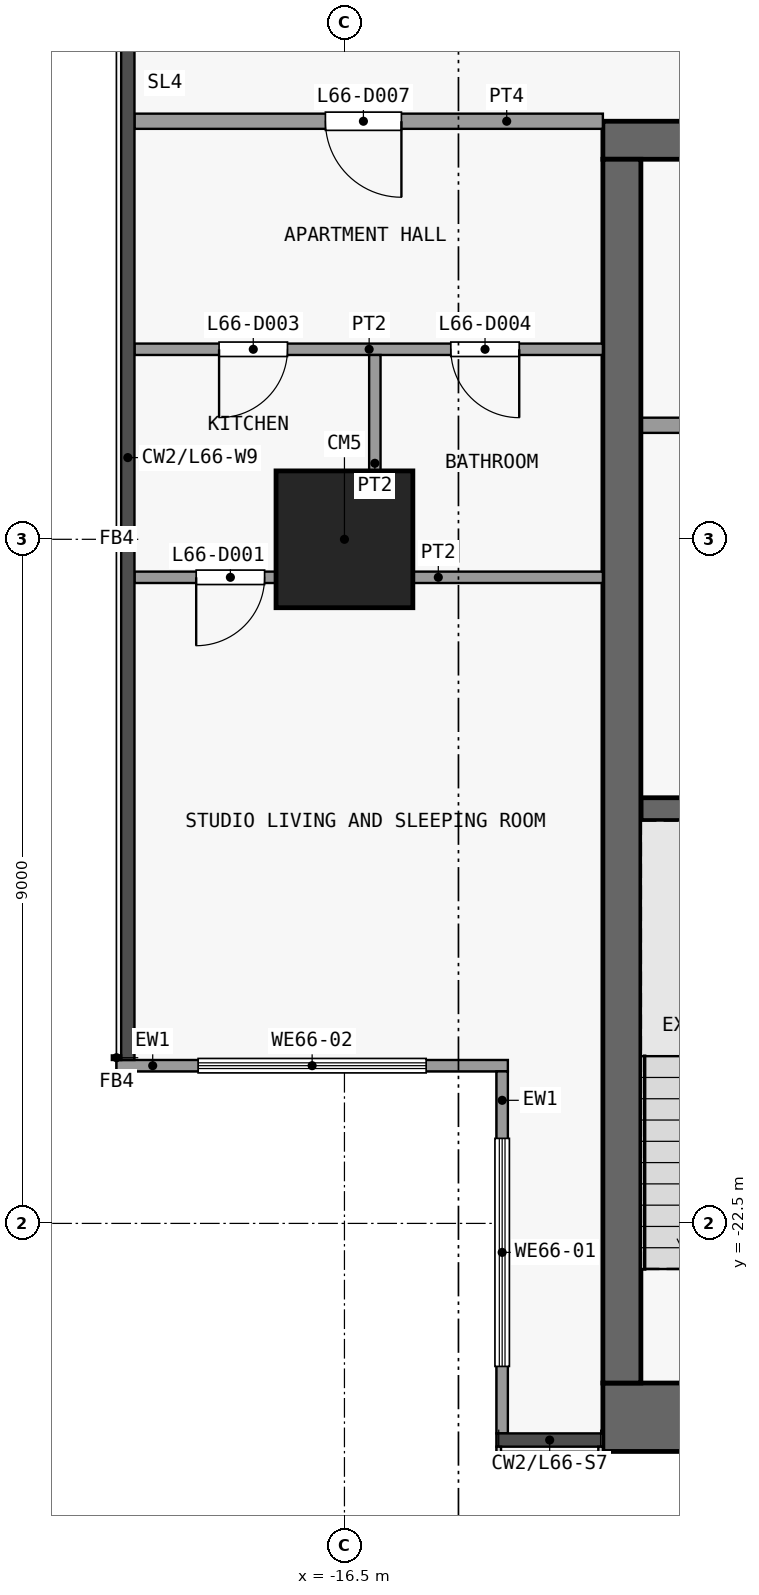
"""IFC4 building model, lengths in metres.
Left out: names, types, materials, properties, quantities, classifications, styles, units other than length and angle.
Written with IfcOpenShell. Run it as: python <this file> out.ifc"""

import sys

from ifc_helpers import new_model, si_unit, direction, frame, frame_2d, origin, origin_2d, place, context, subcontext, project, spatial, rectangle, extrude, element, fill, save


model = new_model("IFC4")
c1 = context("Model", 3, precision=1e-05, world=origin(), true_north=direction((0.0, 1.0)))
c2 = subcontext(c1, "Body", "Model", "MODEL_VIEW")
j1 = project(units=[si_unit("LENGTHUNIT", "METRE"), si_unit("PLANEANGLEUNIT", "RADIAN")], contexts=[c1])
p1 = place(None, origin())
s1 = spatial("IfcSite", under=j1, at=p1, CompositionType="ELEMENT")
p2 = place(p1, origin())
s2 = spatial("IfcBuilding", under=s1, at=p2, CompositionType="ELEMENT")
p3 = place(p2, frame((0.0, 0.0, 262.7)))
s3 = spatial("IfcBuildingStorey", under=s2, at=p3, CompositionType="ELEMENT", Elevation=262.7)
p4 = place(p3, frame((-16.5, -13.5, 0.0), z_axis=(0.0, 0.0, 1.0), x_axis=(1.0, 0.0, 0.0)))
e1 = element("IfcColumn", 1, at=p4, inside=s3, PredefinedType="COLUMN", context=c2, shape_type="SweptSolid", body=[
    extrude(rectangle(XDim=1.8, YDim=1.8, at=origin_2d()), origin(), (0.0, 0.0, 1.0), 3.6),
])
p5 = place(p3, frame((-13.1, -25.05, 0.0), z_axis=(0.0, 0.0, 1.0), x_axis=(1.0, 0.0, 0.0)))
e2 = element("IfcWall", 2, at=p5, inside=s3, PredefinedType="SHEAR", context=c2, shape_type="SweptSolid", body=[
    extrude(rectangle(XDim=26.2, YDim=0.9, at=frame_2d((13.1, 0.0))), origin(), (0.0, 0.0, 1.0), 3.3),
])
p6 = place(p3, frame((-13.1, -8.25, 0.0), z_axis=(0.0, 0.0, 1.0), x_axis=(1.0, 0.0, 0.0)))
e3 = element("IfcWall", 3, at=p6, inside=s3, PredefinedType="SHEAR", context=c2, shape_type="SweptSolid", body=[
    extrude(rectangle(XDim=26.2, YDim=0.5, at=frame_2d((13.1, 0.0))), origin(), (0.0, 0.0, 1.0), 3.3),
])
p7 = place(p6, frame((7.4, 0.0, 0.0)))
e4 = element("IfcOpeningElement", 4, at=p7, cuts=e3, PredefinedType="OPENING", context=c2, shape_type="SweptSolid", body=[
    extrude(rectangle(XDim=1.8, YDim=2.1, at=frame_2d((0.9, 1.05))), frame((0.0, 0.26, 0.0), z_axis=(0.0, -1.0, 0.0), x_axis=(1.0, 0.0, 0.0)), (0.0, 0.0, 1.0), 0.52),
])
p8 = place(p6, frame((17.0, 0.0, 0.0)))
e5 = element("IfcOpeningElement", 5, at=p8, cuts=e3, PredefinedType="OPENING", context=c2, shape_type="SweptSolid", body=[
    extrude(rectangle(XDim=1.8, YDim=2.1, at=frame_2d((0.9, 1.05))), frame((0.0, 0.26, 0.0), z_axis=(0.0, -1.0, 0.0), x_axis=(1.0, 0.0, 0.0)), (0.0, 0.0, 1.0), 0.52),
])
p9 = place(p6, frame((2.325, 0.0, 0.0)))
e6 = element("IfcOpeningElement", 6, at=p9, cuts=e3, PredefinedType="OPENING", context=c2, shape_type="SweptSolid", body=[
    extrude(rectangle(XDim=0.9, YDim=2.1, at=frame_2d((0.45, 1.05))), frame((0.0, 0.26, 0.0), z_axis=(0.0, -1.0, 0.0), x_axis=(1.0, 0.0, 0.0)), (0.0, 0.0, 1.0), 0.52),
])
p10 = place(p6, frame((23.675, 0.0, 0.0)))
e7 = element("IfcOpeningElement", 7, at=p10, cuts=e3, PredefinedType="OPENING", context=c2, shape_type="SweptSolid", body=[
    extrude(rectangle(XDim=1.2, YDim=2.1, at=frame_2d((0.6, 1.05))), frame((0.0, 0.26, 0.0), z_axis=(0.0, -1.0, 0.0), x_axis=(1.0, 0.0, 0.0)), (0.0, 0.0, 1.0), 0.52),
])
p11 = place(p3, frame((-12.85, -24.6, 0.0), z_axis=(0.0, 0.0, 1.0), x_axis=(0.0, 1.0, 0.0)))
e8 = element("IfcWall", 8, at=p11, inside=s3, PredefinedType="SHEAR", context=c2, shape_type="SweptSolid", body=[
    extrude(rectangle(XDim=16.1, YDim=0.5, at=frame_2d((8.05, 0.0))), origin(), (0.0, 0.0, 1.0), 3.3),
])
p12 = place(p3, frame((-12.6, -17.05, 0.0), z_axis=(0.0, 0.0, 1.0), x_axis=(1.0, 0.0, 0.0)))
e9 = element("IfcWall", 9, at=p12, inside=s3, PredefinedType="SHEAR", context=c2, shape_type="SweptSolid", body=[
    extrude(rectangle(XDim=3.1, YDim=0.3, at=frame_2d((1.55, 0.0))), origin(), (0.0, 0.0, 1.0), 3.3),
])
p13 = place(p3, frame((-12.6, -12.0, 0.0), z_axis=(0.0, 0.0, 1.0), x_axis=(1.0, 0.0, 0.0)))
e10 = element("IfcWall", 10, at=p13, inside=s3, PredefinedType="PARTITIONING", context=c2, shape_type="SweptSolid", body=[
    extrude(rectangle(XDim=1.45, YDim=0.2, at=frame_2d((0.725, 0.0))), origin(), (0.0, 0.0, 1.0), 3.3),
])
p14 = place(p3, frame((-14.425, -25.262, 0.0), z_axis=(0.0, 0.0, 1.0), x_axis=(0.0, 1.0, 0.0)))
e11 = element("IfcWall", 11, at=p14, inside=s3, PredefinedType="SOLIDWALL", context=c2, shape_type="SweptSolid", body=[
    extrude(rectangle(XDim=4.762, YDim=0.15, at=frame_2d((2.381, 0.0))), origin(), (0.0, 0.0, 1.0), 3.3),
])
p15 = place(p14, frame((0.881, 0.0, 0.9)))
e12 = element("IfcOpeningElement", 12, at=p15, cuts=e11, PredefinedType="OPENING", context=c2, shape_type="SweptSolid", body=[
    extrude(rectangle(XDim=3.0, YDim=2.4, at=frame_2d((1.5, 1.2))), frame((0.0, 0.085, 0.0), z_axis=(0.0, -1.0, 0.0), x_axis=(1.0, 0.0, 0.0)), (0.0, 0.0, 1.0), 0.17),
])
p16 = place(p3, frame((-14.35, -20.425, 0.0), z_axis=(0.0, 0.0, 1.0), x_axis=(-1.0, 0.0, 0.0)))
e13 = element("IfcWall", 13, at=p16, inside=s3, PredefinedType="SOLIDWALL", context=c2, shape_type="SweptSolid", body=[
    extrude(rectangle(XDim=5.15, YDim=0.15, at=frame_2d((2.575, 0.0))), origin(), (0.0, 0.0, 1.0), 3.3),
])
p17 = place(p16, frame((1.075, 0.0, 0.9)))
e14 = element("IfcOpeningElement", 14, at=p17, cuts=e13, PredefinedType="OPENING", context=c2, shape_type="SweptSolid", body=[
    extrude(rectangle(XDim=3.0, YDim=2.4, at=frame_2d((1.5, 1.2))), frame((0.0, 0.085, 0.0), z_axis=(0.0, -1.0, 0.0), x_axis=(1.0, 0.0, 0.0)), (0.0, 0.0, 1.0), 0.17),
])
p18 = place(p3, frame((-19.262, -14.0, 0.0), z_axis=(0.0, 0.0, 1.0), x_axis=(1.0, 0.0, 0.0)))
e15 = element("IfcWall", 15, at=p18, inside=s3, PredefinedType="PARTITIONING", context=c2, shape_type="SweptSolid", body=[
    extrude(rectangle(XDim=6.162, YDim=0.15, at=frame_2d((3.081, 0.0))), origin(), (0.0, 0.0, 1.0), 3.3),
])
p19 = place(p18, frame((0.812, 0.0, 0.0)))
e16 = element("IfcOpeningElement", 16, at=p19, cuts=e15, PredefinedType="OPENING", context=c2, shape_type="SweptSolid", body=[
    extrude(rectangle(XDim=0.9, YDim=2.1, at=frame_2d((0.45, 1.05))), frame((0.0, 0.085, 0.0), z_axis=(0.0, -1.0, 0.0), x_axis=(1.0, 0.0, 0.0)), (0.0, 0.0, 1.0), 0.17),
])
p20 = place(p3, frame((-19.262, -11.0, 0.0), z_axis=(0.0, 0.0, 1.0), x_axis=(1.0, 0.0, 0.0)))
e17 = element("IfcWall", 17, at=p20, inside=s3, PredefinedType="PARTITIONING", context=c2, shape_type="SweptSolid", body=[
    extrude(rectangle(XDim=6.162, YDim=0.15, at=frame_2d((3.081, 0.0))), origin(), (0.0, 0.0, 1.0), 3.3),
])
p21 = place(p20, frame((1.113, 0.0, 0.0)))
e18 = element("IfcOpeningElement", 18, at=p21, cuts=e17, PredefinedType="OPENING", context=c2, shape_type="SweptSolid", body=[
    extrude(rectangle(XDim=0.9, YDim=2.1, at=frame_2d((0.45, 1.05))), frame((0.0, 0.085, 0.0), z_axis=(0.0, -1.0, 0.0), x_axis=(1.0, 0.0, 0.0)), (0.0, 0.0, 1.0), 0.17),
])
p22 = place(p20, frame((4.162, 0.0, 0.0)))
e19 = element("IfcOpeningElement", 19, at=p22, cuts=e17, PredefinedType="OPENING", context=c2, shape_type="SweptSolid", body=[
    extrude(rectangle(XDim=0.9, YDim=2.1, at=frame_2d((0.45, 1.05))), frame((0.0, 0.085, 0.0), z_axis=(0.0, -1.0, 0.0), x_axis=(1.0, 0.0, 0.0)), (0.0, 0.0, 1.0), 0.17),
])
p23 = place(p3, frame((-19.262, -8.0, 0.0), z_axis=(0.0, 0.0, 1.0), x_axis=(1.0, 0.0, 0.0)))
e20 = element("IfcWall", 20, at=p23, inside=s3, PredefinedType="PARTITIONING", context=c2, shape_type="SweptSolid", body=[
    extrude(rectangle(XDim=6.162, YDim=0.2, at=frame_2d((3.081, 0.0))), origin(), (0.0, 0.0, 1.0), 3.3),
])
p24 = place(p23, frame((2.512, 0.0, 0.0)))
e21 = element("IfcOpeningElement", 21, at=p24, cuts=e20, PredefinedType="OPENING", context=c2, shape_type="SweptSolid", body=[
    extrude(rectangle(XDim=1.0, YDim=2.1, at=frame_2d((0.5, 1.05))), frame((0.0, 0.11, 0.0), z_axis=(0.0, -1.0, 0.0), x_axis=(1.0, 0.0, 0.0)), (0.0, 0.0, 1.0), 0.22),
])
p25 = place(p3, frame((-16.1, -13.925, 0.0), z_axis=(0.0, 0.0, 1.0), x_axis=(0.0, 1.0, 0.0)))
e22 = element("IfcWall", 22, at=p25, inside=s3, PredefinedType="PARTITIONING", context=c2, shape_type="SweptSolid", body=[
    extrude(rectangle(XDim=2.85, YDim=0.15, at=frame_2d((1.425, 0.0))), origin(), (0.0, 0.0, 1.0), 3.3),
])
p26 = place(p15, origin())
e23 = element("IfcWindow", 23, at=p26, inside=s3, PartitioningType="SINGLE_PANEL", PredefinedType="WINDOW", context=c2, shape_type="SweptSolid", body=[
    extrude(rectangle(XDim=3.0, YDim=2.4, at=frame_2d((1.5, 1.2))), frame((0.0, 0.03, 0.0), z_axis=(0.0, -1.0, 0.0), x_axis=(1.0, 0.0, 0.0)), (0.0, 0.0, 1.0), 0.06),
])
fill(e12, e23)
p27 = place(p17, origin())
e24 = element("IfcWindow", 24, at=p27, inside=s3, PartitioningType="SINGLE_PANEL", PredefinedType="WINDOW", context=c2, shape_type="SweptSolid", body=[
    extrude(rectangle(XDim=3.0, YDim=2.4, at=frame_2d((1.5, 1.2))), frame((0.0, 0.03, 0.0), z_axis=(0.0, -1.0, 0.0), x_axis=(1.0, 0.0, 0.0)), (0.0, 0.0, 1.0), 0.06),
])
fill(e14, e24)
p28 = place(p19, origin())
e25 = element("IfcDoor", 25, at=p28, inside=s3, OperationType="SINGLE_SWING_LEFT", PredefinedType="DOOR", context=c2, shape_type="SweptSolid", body=[
    extrude(rectangle(XDim=0.9, YDim=2.1, at=frame_2d((0.45, 1.05))), frame((0.0, 0.025, 0.0), z_axis=(0.0, -1.0, 0.0), x_axis=(1.0, 0.0, 0.0)), (0.0, 0.0, 1.0), 0.05),
])
fill(e16, e25)
p29 = place(p21, origin())
e26 = element("IfcDoor", 26, at=p29, inside=s3, OperationType="SINGLE_SWING_LEFT", PredefinedType="DOOR", context=c2, shape_type="SweptSolid", body=[
    extrude(rectangle(XDim=0.9, YDim=2.1, at=frame_2d((0.45, 1.05))), frame((0.0, 0.025, 0.0), z_axis=(0.0, -1.0, 0.0), x_axis=(1.0, 0.0, 0.0)), (0.0, 0.0, 1.0), 0.05),
])
fill(e18, e26)
p30 = place(p22, origin())
e27 = element("IfcDoor", 27, at=p30, inside=s3, OperationType="SINGLE_SWING_RIGHT", PredefinedType="DOOR", context=c2, shape_type="SweptSolid", body=[
    extrude(rectangle(XDim=0.9, YDim=2.1, at=frame_2d((0.45, 1.05))), frame((0.0, 0.025, 0.0), z_axis=(0.0, -1.0, 0.0), x_axis=(1.0, 0.0, 0.0)), (0.0, 0.0, 1.0), 0.05),
])
fill(e19, e27)
p31 = place(p24, origin())
e28 = element("IfcDoor", 28, at=p31, inside=s3, OperationType="SINGLE_SWING_RIGHT", PredefinedType="DOOR", context=c2, shape_type="SweptSolid", body=[
    extrude(rectangle(XDim=1.0, YDim=2.1, at=frame_2d((0.5, 1.05))), frame((0.0, 0.025, 0.0), z_axis=(0.0, -1.0, 0.0), x_axis=(1.0, 0.0, 0.0)), (0.0, 0.0, 1.0), 0.05),
])
fill(e21, e28)
save(model, sys.argv[1])
